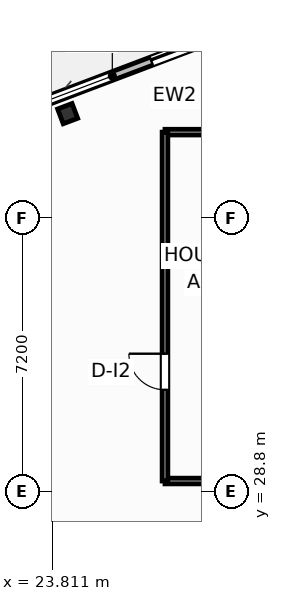
"""IFC4 building model, lengths in metres.
Left out: names, types, materials, properties, quantities, classifications, styles, units other than length and angle.
Written with IfcOpenShell. Run it as: python <this file> out.ifc"""

import sys

from ifc_helpers import new_model, si_unit, direction, frame, frame_2d, origin, origin_2d, place, context, subcontext, project, spatial, rectangle, i_section, extrude, element, fill, save


model = new_model("IFC4")
c1 = context("Model", 3, precision=1e-05, world=origin(), true_north=direction((0.0, 1.0)))
c2 = subcontext(c1, "Body", "Model", "MODEL_VIEW")
j1 = project(units=[si_unit("LENGTHUNIT", "METRE"), si_unit("PLANEANGLEUNIT", "RADIAN")], contexts=[c1])
p1 = place(None, origin())
s1 = spatial("IfcSite", under=j1, at=p1, CompositionType="ELEMENT")
p2 = place(p1, origin())
s2 = spatial("IfcBuilding", under=s1, at=p2, CompositionType="ELEMENT")
p3 = place(p2, frame((0.0, 0.0, 227.5)))
s3 = spatial("IfcBuildingStorey", under=s2, at=p3, CompositionType="ELEMENT", Elevation=227.5)
p4 = place(p3, frame((24.219, 38.747, 0.0), z_axis=(0.0, 0.0, 1.0), x_axis=(0.935221751401, 0.354062530786, 0.0)))
e1 = element("IfcColumn", 1, at=p4, inside=s3, PredefinedType="COLUMN", context=c2, shape_type="SweptSolid", body=[
    extrude(i_section(OverallWidth=0.406, OverallDepth=0.416, WebThickness=0.03, FlangeThickness=0.048, FilletRadius=0.025, at=origin_2d()), origin(), (0.0, 0.0, 1.0), 3.7),
])
p5 = place(p3, frame((23.149, 38.887, 0.0), z_axis=(0.0, 0.0, 1.0), x_axis=(0.9352192676, 0.354069091436, 0.0)))
e2 = element("IfcWall", 2, at=p5, inside=s3, PredefinedType="SOLIDWALL", context=c2, shape_type="SweptSolid", body=[
    extrude(rectangle(XDim=6.0, YDim=0.22, at=frame_2d((3.0, 0.0))), origin(), (0.0, 0.0, 1.0), 2.73),
])
p6 = place(p5, frame((3.5, 0.0, 0.0)))
e3 = element("IfcOpeningElement", 3, at=p6, cuts=e2, PredefinedType="OPENING", context=c2, shape_type="SweptSolid", body=[
    extrude(rectangle(XDim=2.1, YDim=2.3, at=frame_2d((1.05, 1.15))), frame((0.0, 0.12, 0.0), z_axis=(0.0, -1.0, 0.0), x_axis=(1.0, 0.0, 0.0)), (0.0, 0.0, 1.0), 0.24),
])
p7 = place(p5, frame((0.55, 0.0, 0.75)))
e4 = element("IfcOpeningElement", 4, at=p7, cuts=e2, PredefinedType="OPENING", context=c2, shape_type="SweptSolid", body=[
    extrude(rectangle(XDim=1.85, YDim=1.75, at=frame_2d((0.925, 0.875))), frame((0.0, 0.12, 0.0), z_axis=(0.0, -1.0, 0.0), x_axis=(1.0, 0.0, 0.0)), (0.0, 0.0, 1.0), 0.24),
])
p8 = place(p3, frame((26.78, 29.08, 0.0), z_axis=(0.0, 0.0, 1.0), x_axis=(1.0, 0.0, 0.0)))
e5 = element("IfcWall", 5, at=p8, inside=s3, PredefinedType="PARTITIONING", context=c2, shape_type="SweptSolid", body=[
    extrude(rectangle(XDim=3.7, YDim=0.15, at=frame_2d((1.85, 0.0))), origin(), (0.0, 0.0, 1.0), 3.45),
])
p9 = place(p3, frame((26.78, 38.26, 0.0), z_axis=(0.0, 0.0, 1.0), x_axis=(1.0, 0.0, 0.0)))
e6 = element("IfcWall", 6, at=p9, inside=s3, PredefinedType="PARTITIONING", context=c2, shape_type="SweptSolid", body=[
    extrude(rectangle(XDim=3.9, YDim=0.15, at=frame_2d((1.95, 0.0))), origin(), (0.0, 0.0, 1.0), 3.45),
])
p10 = place(p3, frame((26.78, 29.08, 0.0), z_axis=(0.0, 0.0, 1.0), x_axis=(0.0, 1.0, 0.0)))
e7 = element("IfcWall", 7, at=p10, inside=s3, PredefinedType="PARTITIONING", context=c2, shape_type="SweptSolid", body=[
    extrude(rectangle(XDim=9.18, YDim=0.15, at=frame_2d((4.59, 0.0))), origin(), (0.0, 0.0, 1.0), 3.45),
])
p11 = place(p10, frame((2.4, 0.0, 0.0)))
e8 = element("IfcOpeningElement", 8, at=p11, cuts=e7, PredefinedType="OPENING", context=c2, shape_type="SweptSolid", body=[
    extrude(rectangle(XDim=0.95, YDim=2.05, at=frame_2d((0.475, 1.025))), frame((0.0, 0.085, 0.0), z_axis=(0.0, -1.0, 0.0), x_axis=(1.0, 0.0, 0.0)), (0.0, 0.0, 1.0), 0.17),
])
p12 = place(p6, origin())
e9 = element("IfcDoor", 9, at=p12, inside=s3, OperationType="SLIDING_TO_LEFT", PredefinedType="DOOR", context=c2, shape_type="SweptSolid", body=[
    extrude(rectangle(XDim=2.1, YDim=2.3, at=frame_2d((1.05, 1.15))), frame((0.0, 0.025, 0.0), z_axis=(0.0, -1.0, 0.0), x_axis=(1.0, 0.0, 0.0)), (0.0, 0.0, 1.0), 0.05),
])
fill(e3, e9)
p13 = place(p7, origin())
e10 = element("IfcWindow", 10, at=p13, inside=s3, PartitioningType="SINGLE_PANEL", PredefinedType="WINDOW", context=c2, shape_type="SweptSolid", body=[
    extrude(rectangle(XDim=1.85, YDim=1.75, at=frame_2d((0.925, 0.875))), frame((0.0, 0.03, 0.0), z_axis=(0.0, -1.0, 0.0), x_axis=(1.0, 0.0, 0.0)), (0.0, 0.0, 1.0), 0.06),
])
fill(e4, e10)
p14 = place(p11, origin())
e11 = element("IfcDoor", 11, at=p14, inside=s3, OperationType="SINGLE_SWING_RIGHT", PredefinedType="DOOR", context=c2, shape_type="SweptSolid", body=[
    extrude(rectangle(XDim=0.95, YDim=2.05, at=frame_2d((0.475, 1.025))), frame((0.0, 0.025, 0.0), z_axis=(0.0, -1.0, 0.0), x_axis=(1.0, 0.0, 0.0)), (0.0, 0.0, 1.0), 0.05),
])
fill(e8, e11)
save(model, sys.argv[1])
